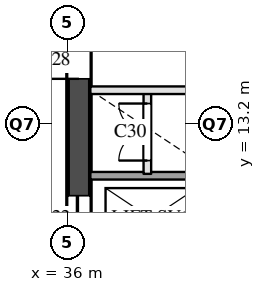
"""IFC4 building model, lengths in metres.
Left out: names, types, materials, properties, quantities, classifications, styles, units other than length and angle.
Written with IfcOpenShell. Run it as: python <this file> out.ifc"""

import sys

from ifc_helpers import new_model, si_unit, direction, frame, frame_2d, origin, place, context, subcontext, project, spatial, rectangle, extrude, element, fill, save


model = new_model("IFC4")
c1 = context("Model", 3, precision=1e-05, world=origin(), true_north=direction((0.0, 1.0)))
c2 = subcontext(c1, "Body", "Model", "MODEL_VIEW")
j1 = project(units=[si_unit("LENGTHUNIT", "METRE"), si_unit("PLANEANGLEUNIT", "RADIAN")], contexts=[c1])
p1 = place(None, origin())
s1 = spatial("IfcSite", under=j1, at=p1, CompositionType="ELEMENT")
p2 = place(p1, origin())
s2 = spatial("IfcBuilding", under=s1, at=p2, CompositionType="ELEMENT")
p3 = place(p2, frame((0.0, 0.0, 26.0)))
s3 = spatial("IfcBuildingStorey", under=s2, at=p3, CompositionType="ELEMENT", Elevation=26.0)
p4 = place(p3, frame((36.3, 9.6, 0.0), z_axis=(0.0, 0.0, 1.0), x_axis=(0.0, 1.0, 0.0)))
e1 = element("IfcWall", 1, at=p4, inside=s3, PredefinedType="SHEAR", context=c2, shape_type="SweptSolid", body=[
    extrude(rectangle(XDim=12.3, YDim=0.6, at=frame_2d((6.15, 0.0))), origin(), (0.0, 0.0, 1.0), 4.7),
])
p5 = place(p4, frame((0.525, 0.0, 0.0)))
e2 = element("IfcOpeningElement", 2, at=p5, cuts=e1, PredefinedType="OPENING", context=c2, shape_type="SweptSolid", body=[
    extrude(rectangle(XDim=1.2, YDim=2.1, at=frame_2d((0.6, 1.05))), frame((0.0, 0.31, 0.0), z_axis=(0.0, -1.0, 0.0), x_axis=(1.0, 0.0, 0.0)), (0.0, 0.0, 1.0), 0.62),
])
p6 = place(p4, frame((4.8, 0.0, 0.0)))
e3 = element("IfcOpeningElement", 3, at=p6, cuts=e1, PredefinedType="OPENING", context=c2, shape_type="SweptSolid", body=[
    extrude(rectangle(XDim=1.0, YDim=2.1, at=frame_2d((0.5, 1.05))), frame((0.0, 0.31, 0.0), z_axis=(0.0, -1.0, 0.0), x_axis=(1.0, 0.0, 0.0)), (0.0, 0.0, 1.0), 0.62),
])
p7 = place(p3, frame((38.1, 11.9, 0.0), z_axis=(0.0, 0.0, 1.0), x_axis=(0.0, 1.0, 0.0)))
e4 = element("IfcWall", 4, at=p7, inside=s3, PredefinedType="PARTITIONING", context=c2, shape_type="SweptSolid", body=[
    extrude(rectangle(XDim=2.2, YDim=0.2, at=frame_2d((1.1, 0.0))), origin(), (0.0, 0.0, 1.0), 4.7),
])
p8 = place(p7, frame((0.35, 0.0, 0.0)))
e5 = element("IfcOpeningElement", 5, at=p8, cuts=e4, PredefinedType="OPENING", context=c2, shape_type="SweptSolid", body=[
    extrude(rectangle(XDim=1.5, YDim=2.1, at=frame_2d((0.75, 1.05))), frame((0.0, 0.11, 0.0), z_axis=(0.0, -1.0, 0.0), x_axis=(1.0, 0.0, 0.0)), (0.0, 0.0, 1.0), 0.22),
])
p9 = place(p3, frame((36.6, 11.85, 0.0), z_axis=(0.0, 0.0, 1.0), x_axis=(1.0, 0.0, 0.0)))
e6 = element("IfcWall", 6, at=p9, inside=s3, PredefinedType="SOLIDWALL", context=c2, shape_type="SweptSolid", body=[
    extrude(rectangle(XDim=7.8, YDim=0.2, at=frame_2d((3.9, 0.0))), origin(), (0.0, 0.0, 1.0), 4.7),
])
p10 = place(p3, frame((36.6, 14.1, 0.0), z_axis=(0.0, 0.0, 1.0), x_axis=(1.0, 0.0, 0.0)))
e7 = element("IfcWall", 7, at=p10, inside=s3, PredefinedType="PARTITIONING", context=c2, shape_type="SweptSolid", body=[
    extrude(rectangle(XDim=6.0, YDim=0.2, at=frame_2d((3.0, 0.0))), origin(), (0.0, 0.0, 1.0), 4.7),
])
p11 = place(p10, frame((3.0, 0.0, 0.0)))
e8 = element("IfcOpeningElement", 8, at=p11, cuts=e7, PredefinedType="OPENING", context=c2, shape_type="SweptSolid", body=[
    extrude(rectangle(XDim=1.5, YDim=2.1, at=frame_2d((0.75, 1.05))), frame((0.0, 0.11, 0.0), z_axis=(0.0, -1.0, 0.0), x_axis=(1.0, 0.0, 0.0)), (0.0, 0.0, 1.0), 0.22),
])
p12 = place(p5, origin())
e9 = element("IfcDoor", 9, at=p12, inside=s3, OperationType="SLIDING_TO_LEFT", PredefinedType="DOOR", context=c2, shape_type="SweptSolid", body=[
    extrude(rectangle(XDim=1.2, YDim=2.1, at=frame_2d((0.6, 1.05))), frame((0.0, 0.025, 0.0), z_axis=(0.0, -1.0, 0.0), x_axis=(1.0, 0.0, 0.0)), (0.0, 0.0, 1.0), 0.05),
])
fill(e2, e9)
p13 = place(p6, origin())
e10 = element("IfcDoor", 10, at=p13, inside=s3, OperationType="SINGLE_SWING_LEFT", PredefinedType="DOOR", context=c2, shape_type="SweptSolid", body=[
    extrude(rectangle(XDim=1.0, YDim=2.1, at=frame_2d((0.5, 1.05))), frame((0.0, 0.025, 0.0), z_axis=(0.0, -1.0, 0.0), x_axis=(1.0, 0.0, 0.0)), (0.0, 0.0, 1.0), 0.05),
])
fill(e3, e10)
p14 = place(p8, origin())
e11 = element("IfcDoor", 11, at=p14, inside=s3, OperationType="DOUBLE_DOOR_SINGLE_SWING", PredefinedType="DOOR", context=c2, shape_type="SweptSolid", body=[
    extrude(rectangle(XDim=1.5, YDim=2.1, at=frame_2d((0.75, 1.05))), frame((0.0, 0.025, 0.0), z_axis=(0.0, -1.0, 0.0), x_axis=(1.0, 0.0, 0.0)), (0.0, 0.0, 1.0), 0.05),
])
fill(e5, e11)
save(model, sys.argv[1])
